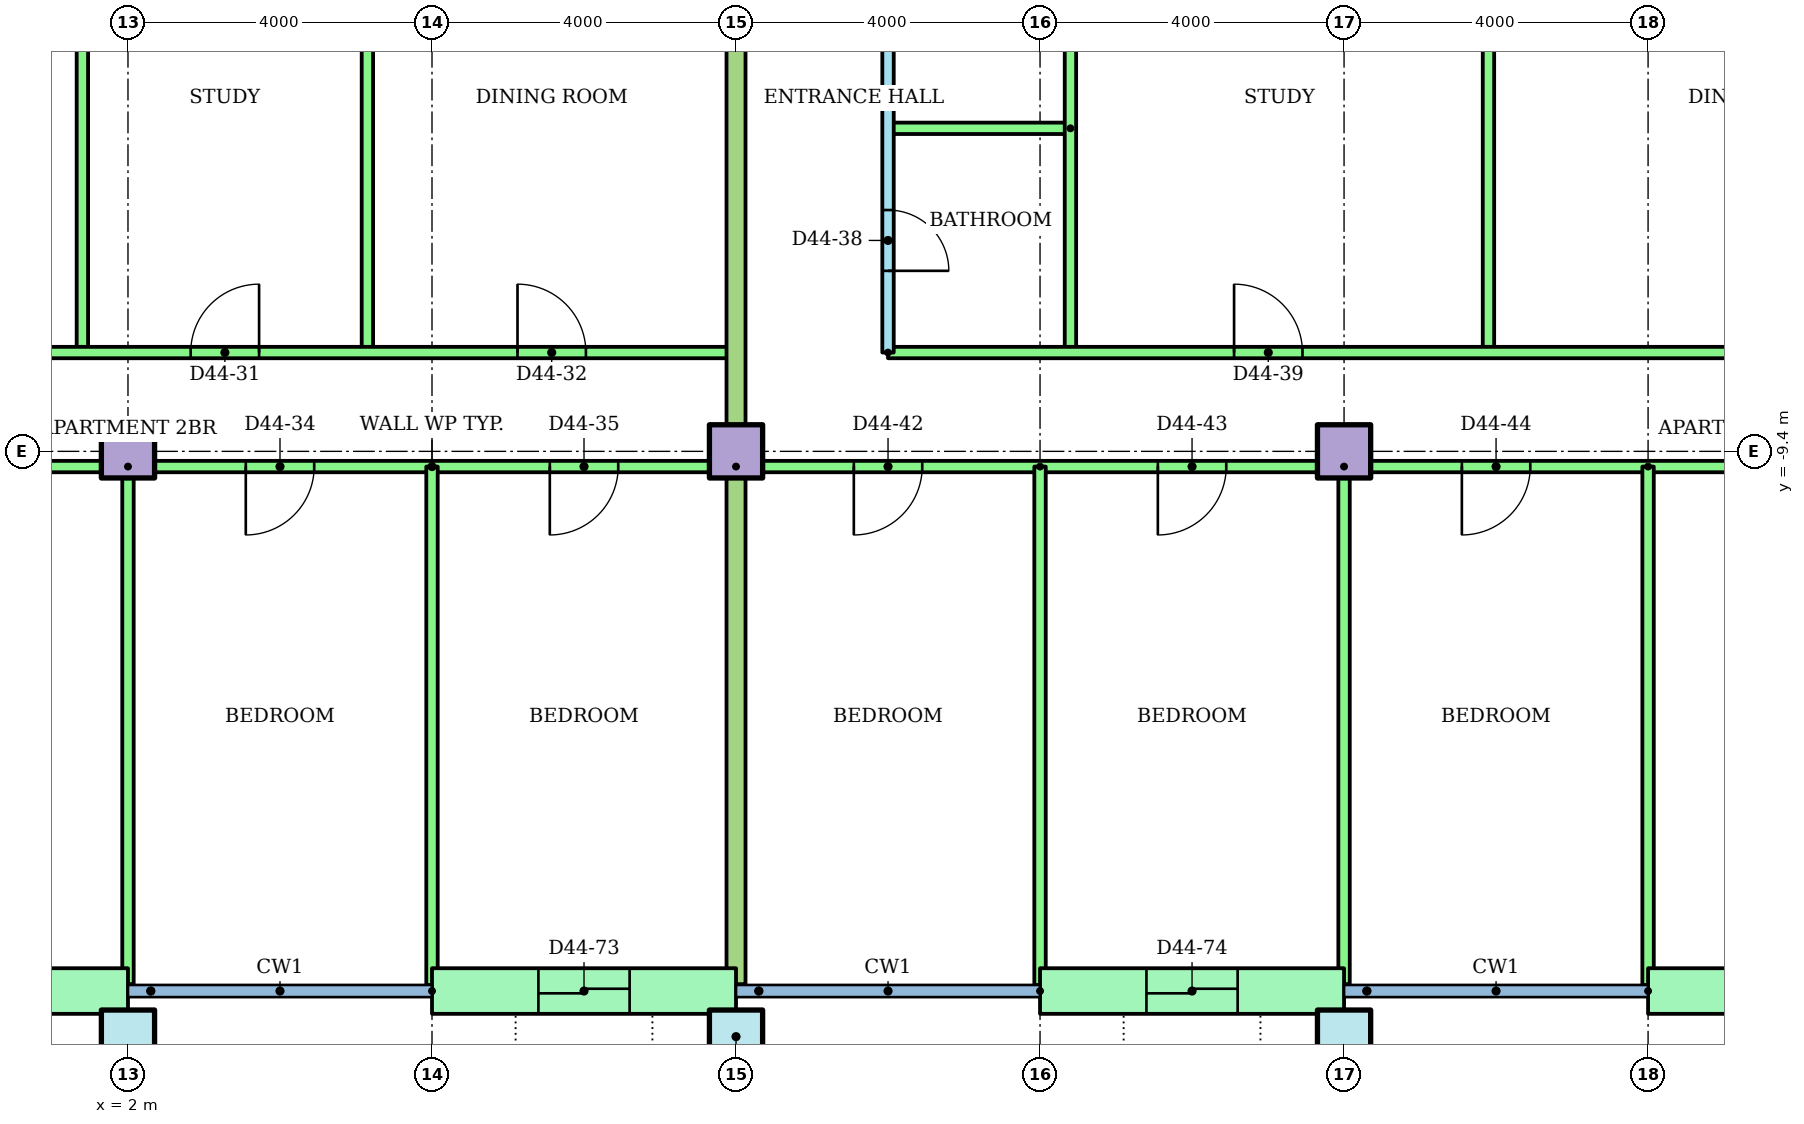
"""IFC4 building model, lengths in metres.
Left out: names, types, materials, properties, quantities, classifications, styles, units other than length and angle.
Written with IfcOpenShell. Run it as: python <this file> out.ifc"""

import sys

from ifc_helpers import new_model, si_unit, direction, frame, frame_2d, origin, origin_2d, place, context, subcontext, project, spatial, rectangle, hollow_rectangle, extrude, element, fill, save


model = new_model("IFC4")
c1 = context("Model", 3, precision=1e-05, world=origin(), true_north=direction((0.0, 1.0)))
c2 = subcontext(c1, "Body", "Model", "MODEL_VIEW")
j1 = project(units=[si_unit("LENGTHUNIT", "METRE"), si_unit("PLANEANGLEUNIT", "RADIAN")], contexts=[c1])
p1 = place(None, origin())
s1 = spatial("IfcSite", under=j1, at=p1, CompositionType="ELEMENT")
p2 = place(p1, origin())
s2 = spatial("IfcBuilding", under=s1, at=p2, CompositionType="ELEMENT")
p3 = place(p2, frame((0.0, 0.0, 171.7)))
s3 = spatial("IfcBuildingStorey", under=s2, at=p3, CompositionType="ELEMENT", Elevation=171.7)
for number, where in (
    (1, (2.0, -17.1, 0.0)),
    (2, (10.0, -17.1, 0.0)),
    (3, (18.0, -17.1, 0.0)),
):
    element("IfcColumn", number, at=place(p3, frame(where)), inside=s3, PredefinedType="COLUMN", context=c2, shape_type="SweptSolid", body=[
        extrude(hollow_rectangle(XDim=0.7, YDim=0.7, WallThickness=0.036, at=origin_2d()), origin(), (0.0, 0.0, 1.0), 3.2),
    ])
for number, where in (
    (4, (2.0, -9.4, 0.0)),
    (5, (10.0, -9.4, 0.0)),
    (6, (18.0, -9.4, 0.0)),
):
    element("IfcColumn", number, at=place(p3, frame(where)), inside=s3, PredefinedType="COLUMN", context=c2, shape_type="SweptSolid", body=[
        extrude(rectangle(XDim=0.7, YDim=0.7, at=origin_2d()), origin(), (0.0, 0.0, 1.0), 3.2),
    ])
p4 = place(p3, frame((-2.0, -16.5, 0.0)))
e7 = element("IfcWall", 7, at=p4, inside=s3, PredefinedType="STANDARD", context=c2, shape_type="SweptSolid", body=[
    extrude(rectangle(XDim=4.0, YDim=0.6, at=frame_2d((2.0, 0.0))), origin(), (0.0, 0.0, 1.0), 2.92),
])
p5 = place(p4, frame((1.4, 0.0, 0.0)))
e8 = element("IfcOpeningElement", 8, at=p5, cuts=e7, PredefinedType="OPENING", context=c2, shape_type="SweptSolid", body=[
    extrude(rectangle(XDim=1.2, YDim=2.1, at=frame_2d((0.6, 1.05))), frame((0.0, 0.31, 0.0), z_axis=(0.0, -1.0, 0.0), x_axis=(1.0, 0.0, 0.0)), (0.0, 0.0, 1.0), 0.62),
])
p6 = place(p3, frame((6.0, -16.5, 0.0)))
e9 = element("IfcWall", 9, at=p6, inside=s3, PredefinedType="STANDARD", context=c2, shape_type="SweptSolid", body=[
    extrude(rectangle(XDim=4.0, YDim=0.6, at=frame_2d((2.0, 0.0))), origin(), (0.0, 0.0, 1.0), 2.92),
])
p7 = place(p6, frame((1.4, 0.0, 0.0)))
e10 = element("IfcOpeningElement", 10, at=p7, cuts=e9, PredefinedType="OPENING", context=c2, shape_type="SweptSolid", body=[
    extrude(rectangle(XDim=1.2, YDim=2.1, at=frame_2d((0.6, 1.05))), frame((0.0, 0.31, 0.0), z_axis=(0.0, -1.0, 0.0), x_axis=(1.0, 0.0, 0.0)), (0.0, 0.0, 1.0), 0.62),
])
p8 = place(p3, frame((14.0, -16.5, 0.0)))
e11 = element("IfcWall", 11, at=p8, inside=s3, PredefinedType="STANDARD", context=c2, shape_type="SweptSolid", body=[
    extrude(rectangle(XDim=4.0, YDim=0.6, at=frame_2d((2.0, 0.0))), origin(), (0.0, 0.0, 1.0), 2.92),
])
p9 = place(p8, frame((1.4, 0.0, 0.0)))
e12 = element("IfcOpeningElement", 12, at=p9, cuts=e11, PredefinedType="OPENING", context=c2, shape_type="SweptSolid", body=[
    extrude(rectangle(XDim=1.2, YDim=2.1, at=frame_2d((0.6, 1.05))), frame((0.0, 0.31, 0.0), z_axis=(0.0, -1.0, 0.0), x_axis=(1.0, 0.0, 0.0)), (0.0, 0.0, 1.0), 0.62),
])
p10 = place(p3, frame((22.0, -16.5, 0.0)))
e13 = element("IfcWall", 13, at=p10, inside=s3, PredefinedType="STANDARD", context=c2, shape_type="SweptSolid", body=[
    extrude(rectangle(XDim=4.0, YDim=0.6, at=frame_2d((2.0, 0.0))), origin(), (0.0, 0.0, 1.0), 2.92),
])
p11 = place(p10, frame((1.4, 0.0, 0.0)))
e14 = element("IfcOpeningElement", 14, at=p11, cuts=e13, PredefinedType="OPENING", context=c2, shape_type="SweptSolid", body=[
    extrude(rectangle(XDim=1.2, YDim=2.1, at=frame_2d((0.6, 1.05))), frame((0.0, 0.31, 0.0), z_axis=(0.0, -1.0, 0.0), x_axis=(1.0, 0.0, 0.0)), (0.0, 0.0, 1.0), 0.62),
])
for number, where, z_axis, x_axis in (
    (15, (1.4, -1.4, 0.0), (0.0, 0.0, 1.0), (0.0, -1.0, 0.0)),
    (16, (5.15, -1.4, 0.0), (0.0, 0.0, 1.0), (0.0, -1.0, 0.0)),
):
    element("IfcWall", number, at=place(p3, frame(where, z_axis=z_axis, x_axis=x_axis)), inside=s3, PredefinedType="PARTITIONING", context=c2, shape_type="SweptSolid", body=[
        extrude(rectangle(XDim=6.7, YDim=0.15, at=frame_2d((3.35, 0.0))), origin(), (0.0, 0.0, 1.0), 2.4),
    ])
p12 = place(p3, frame((-4.0, -8.1, 0.0)))
e17 = element("IfcWall", 17, at=p12, inside=s3, PredefinedType="PARTITIONING", context=c2, shape_type="SweptSolid", body=[
    extrude(rectangle(XDim=14.0, YDim=0.15, at=frame_2d((7.0, 0.0))), origin(), (0.0, 0.0, 1.0), 2.4),
])
p13 = place(p12, frame((3.45, 0.0, 0.0)))
e18 = element("IfcOpeningElement", 18, at=p13, cuts=e17, PredefinedType="OPENING", context=c2, shape_type="SweptSolid", body=[
    extrude(rectangle(XDim=0.9, YDim=2.1, at=frame_2d((0.45, 1.05))), frame((0.0, 0.085, 0.0), z_axis=(0.0, -1.0, 0.0), x_axis=(1.0, 0.0, 0.0)), (0.0, 0.0, 1.0), 0.17),
])
p14 = place(p12, frame((6.825, 0.0, 0.0)))
e19 = element("IfcOpeningElement", 19, at=p14, cuts=e17, PredefinedType="OPENING", context=c2, shape_type="SweptSolid", body=[
    extrude(rectangle(XDim=0.9, YDim=2.1, at=frame_2d((0.45, 1.05))), frame((0.0, 0.085, 0.0), z_axis=(0.0, -1.0, 0.0), x_axis=(1.0, 0.0, 0.0)), (0.0, 0.0, 1.0), 0.17),
])
p15 = place(p12, frame((11.125, 0.0, 0.0)))
e20 = element("IfcOpeningElement", 20, at=p15, cuts=e17, PredefinedType="OPENING", context=c2, shape_type="SweptSolid", body=[
    extrude(rectangle(XDim=0.9, YDim=2.1, at=frame_2d((0.45, 1.05))), frame((0.0, 0.085, 0.0), z_axis=(0.0, -1.0, 0.0), x_axis=(1.0, 0.0, 0.0)), (0.0, 0.0, 1.0), 0.17),
])
p16 = place(p3, frame((10.0, -9.6, 0.0), z_axis=(0.0, 0.0, 1.0), x_axis=(-1.0, 0.0, 0.0)))
e21 = element("IfcWall", 21, at=p16, inside=s3, PredefinedType="PARTITIONING", context=c2, shape_type="SweptSolid", body=[
    extrude(rectangle(XDim=16.0, YDim=0.15, at=frame_2d((8.0, 0.0))), origin(), (0.0, 0.0, 1.0), 2.4),
])
p17 = place(p16, frame((11.5, 0.0, 0.0)))
e22 = element("IfcOpeningElement", 22, at=p17, cuts=e21, PredefinedType="OPENING", context=c2, shape_type="SweptSolid", body=[
    extrude(rectangle(XDim=1.0, YDim=2.1, at=frame_2d((0.5, 1.05))), frame((0.0, 0.085, 0.0), z_axis=(0.0, -1.0, 0.0), x_axis=(1.0, 0.0, 0.0)), (0.0, 0.0, 1.0), 0.17),
])
p18 = place(p16, frame((5.55, 0.0, 0.0)))
e23 = element("IfcOpeningElement", 23, at=p18, cuts=e21, PredefinedType="OPENING", context=c2, shape_type="SweptSolid", body=[
    extrude(rectangle(XDim=0.9, YDim=2.1, at=frame_2d((0.45, 1.05))), frame((0.0, 0.085, 0.0), z_axis=(0.0, -1.0, 0.0), x_axis=(1.0, 0.0, 0.0)), (0.0, 0.0, 1.0), 0.17),
])
p19 = place(p16, frame((1.55, 0.0, 0.0)))
e24 = element("IfcOpeningElement", 24, at=p19, cuts=e21, PredefinedType="OPENING", context=c2, shape_type="SweptSolid", body=[
    extrude(rectangle(XDim=0.9, YDim=2.1, at=frame_2d((0.45, 1.05))), frame((0.0, 0.085, 0.0), z_axis=(0.0, -1.0, 0.0), x_axis=(1.0, 0.0, 0.0)), (0.0, 0.0, 1.0), 0.17),
])
p20 = place(p3, frame((2.0, -9.6, 0.0), z_axis=(0.0, 0.0, 1.0), x_axis=(0.0, -1.0, 0.0)))
e25 = element("IfcWall", 25, at=p20, inside=s3, PredefinedType="PARTITIONING", context=c2, shape_type="SweptSolid", body=[
    extrude(rectangle(XDim=6.81, YDim=0.15, at=frame_2d((3.405, 0.0))), origin(), (0.0, 0.0, 1.0), 2.4),
])
p21 = place(p3, frame((6.0, -9.6, 0.0), z_axis=(0.0, 0.0, 1.0), x_axis=(0.0, -1.0, 0.0)))
e26 = element("IfcWall", 26, at=p21, inside=s3, PredefinedType="PARTITIONING", context=c2, shape_type="SweptSolid", body=[
    extrude(rectangle(XDim=6.821, YDim=0.15, at=frame_2d((3.41, 0.0))), origin(), (0.0, 0.0, 1.0), 2.4),
])
p22 = place(p3, frame((12.0, -1.4, 0.0), z_axis=(0.0, 0.0, 1.0), x_axis=(0.0, -1.0, 0.0)))
e27 = element("IfcWall", 27, at=p22, inside=s3, PredefinedType="PARTITIONING", context=c2, shape_type="SweptSolid", body=[
    extrude(rectangle(XDim=6.7, YDim=0.15, at=frame_2d((3.35, 0.0))), origin(), (0.0, 0.0, 1.0), 2.4),
])
p23 = place(p22, frame((1.425, 0.0, 0.0)))
e28 = element("IfcOpeningElement", 28, at=p23, cuts=e27, PredefinedType="OPENING", context=c2, shape_type="SweptSolid", body=[
    extrude(rectangle(XDim=0.9, YDim=2.1, at=frame_2d((0.45, 1.05))), frame((0.0, 0.085, 0.0), z_axis=(0.0, -1.0, 0.0), x_axis=(1.0, 0.0, 0.0)), (0.0, 0.0, 1.0), 0.17),
])
p24 = place(p22, frame((4.825, 0.0, 0.0)))
e29 = element("IfcOpeningElement", 29, at=p24, cuts=e27, PredefinedType="OPENING", context=c2, shape_type="SweptSolid", body=[
    extrude(rectangle(XDim=0.8, YDim=2.1, at=frame_2d((0.4, 1.05))), frame((0.0, 0.085, 0.0), z_axis=(0.0, -1.0, 0.0), x_axis=(1.0, 0.0, 0.0)), (0.0, 0.0, 1.0), 0.17),
])
p25 = place(p3, frame((14.4, -5.15, 0.0), z_axis=(0.0, 0.0, 1.0), x_axis=(-1.0, 0.0, 0.0)))
e30 = element("IfcWall", 30, at=p25, inside=s3, PredefinedType="PARTITIONING", context=c2, shape_type="SweptSolid", body=[
    extrude(rectangle(XDim=2.4, YDim=0.15, at=frame_2d((1.2, 0.0))), origin(), (0.0, 0.0, 1.0), 2.4),
])
for number, where, z_axis, x_axis in (
    (31, (14.4, -1.4, 0.0), (0.0, 0.0, 1.0), (0.0, -1.0, 0.0)),
    (32, (19.9, -1.4, 0.0), (0.0, 0.0, 1.0), (0.0, -1.0, 0.0)),
):
    element("IfcWall", number, at=place(p3, frame(where, z_axis=z_axis, x_axis=x_axis)), inside=s3, PredefinedType="PARTITIONING", context=c2, shape_type="SweptSolid", body=[
        extrude(rectangle(XDim=6.7, YDim=0.15, at=frame_2d((3.35, 0.0))), origin(), (0.0, 0.0, 1.0), 2.4),
    ])
p26 = place(p3, frame((12.0, -8.1, 0.0)))
e33 = element("IfcWall", 33, at=p26, inside=s3, PredefinedType="PARTITIONING", context=c2, shape_type="SweptSolid", body=[
    extrude(rectangle(XDim=24.82, YDim=0.15, at=frame_2d((12.41, 0.0))), origin(), (0.0, 0.0, 1.0), 2.4),
])
p27 = place(p26, frame((4.553, 0.0, 0.0)))
e34 = element("IfcOpeningElement", 34, at=p27, cuts=e33, PredefinedType="OPENING", context=c2, shape_type="SweptSolid", body=[
    extrude(rectangle(XDim=0.9, YDim=2.1, at=frame_2d((0.45, 1.05))), frame((0.0, 0.085, 0.0), z_axis=(0.0, -1.0, 0.0), x_axis=(1.0, 0.0, 0.0)), (0.0, 0.0, 1.0), 0.17),
])
p28 = place(p26, frame((11.075, 0.0, 0.0)))
e35 = element("IfcOpeningElement", 35, at=p28, cuts=e33, PredefinedType="OPENING", context=c2, shape_type="SweptSolid", body=[
    extrude(rectangle(XDim=0.9, YDim=2.1, at=frame_2d((0.45, 1.05))), frame((0.0, 0.085, 0.0), z_axis=(0.0, -1.0, 0.0), x_axis=(1.0, 0.0, 0.0)), (0.0, 0.0, 1.0), 0.17),
])
p29 = place(p26, frame((19.425, 0.0, 0.0)))
e36 = element("IfcOpeningElement", 36, at=p29, cuts=e33, PredefinedType="OPENING", context=c2, shape_type="SweptSolid", body=[
    extrude(rectangle(XDim=0.9, YDim=2.1, at=frame_2d((0.45, 1.05))), frame((0.0, 0.085, 0.0), z_axis=(0.0, -1.0, 0.0), x_axis=(1.0, 0.0, 0.0)), (0.0, 0.0, 1.0), 0.17),
])
p30 = place(p3, frame((36.82, -9.6, 0.0), z_axis=(0.0, 0.0, 1.0), x_axis=(-1.0, 0.0, 0.0)))
e37 = element("IfcWall", 37, at=p30, inside=s3, PredefinedType="PARTITIONING", context=c2, shape_type="SweptSolid", body=[
    extrude(rectangle(XDim=26.82, YDim=0.15, at=frame_2d((13.41, 0.0))), origin(), (0.0, 0.0, 1.0), 2.4),
])
p31 = place(p30, frame((24.37, 0.0, 0.0)))
e38 = element("IfcOpeningElement", 38, at=p31, cuts=e37, PredefinedType="OPENING", context=c2, shape_type="SweptSolid", body=[
    extrude(rectangle(XDim=0.9, YDim=2.1, at=frame_2d((0.45, 1.05))), frame((0.0, 0.085, 0.0), z_axis=(0.0, -1.0, 0.0), x_axis=(1.0, 0.0, 0.0)), (0.0, 0.0, 1.0), 0.17),
])
p32 = place(p30, frame((20.37, 0.0, 0.0)))
e39 = element("IfcOpeningElement", 39, at=p32, cuts=e37, PredefinedType="OPENING", context=c2, shape_type="SweptSolid", body=[
    extrude(rectangle(XDim=0.9, YDim=2.1, at=frame_2d((0.45, 1.05))), frame((0.0, 0.085, 0.0), z_axis=(0.0, -1.0, 0.0), x_axis=(1.0, 0.0, 0.0)), (0.0, 0.0, 1.0), 0.17),
])
p33 = place(p30, frame((16.37, 0.0, 0.0)))
e40 = element("IfcOpeningElement", 40, at=p33, cuts=e37, PredefinedType="OPENING", context=c2, shape_type="SweptSolid", body=[
    extrude(rectangle(XDim=0.9, YDim=2.1, at=frame_2d((0.45, 1.05))), frame((0.0, 0.085, 0.0), z_axis=(0.0, -1.0, 0.0), x_axis=(1.0, 0.0, 0.0)), (0.0, 0.0, 1.0), 0.17),
])
p34 = place(p30, frame((9.27, 0.0, 0.0)))
e41 = element("IfcOpeningElement", 41, at=p34, cuts=e37, PredefinedType="OPENING", context=c2, shape_type="SweptSolid", body=[
    extrude(rectangle(XDim=1.0, YDim=2.1, at=frame_2d((0.5, 1.05))), frame((0.0, 0.085, 0.0), z_axis=(0.0, -1.0, 0.0), x_axis=(1.0, 0.0, 0.0)), (0.0, 0.0, 1.0), 0.17),
])
p35 = place(p30, frame((1.373, 0.0, 0.0)))
e42 = element("IfcOpeningElement", 42, at=p35, cuts=e37, PredefinedType="OPENING", context=c2, shape_type="SweptSolid", body=[
    extrude(rectangle(XDim=0.9, YDim=2.1, at=frame_2d((0.45, 1.05))), frame((0.0, 0.085, 0.0), z_axis=(0.0, -1.0, 0.0), x_axis=(1.0, 0.0, 0.0)), (0.0, 0.0, 1.0), 0.17),
])
p36 = place(p3, frame((14.0, -9.6, 0.0), z_axis=(0.0, 0.0, 1.0), x_axis=(0.0, -1.0, 0.0)))
e43 = element("IfcWall", 43, at=p36, inside=s3, PredefinedType="PARTITIONING", context=c2, shape_type="SweptSolid", body=[
    extrude(rectangle(XDim=6.821, YDim=0.15, at=frame_2d((3.41, 0.0))), origin(), (0.0, 0.0, 1.0), 2.4),
])
p37 = place(p3, frame((18.0, -9.6, 0.0), z_axis=(0.0, 0.0, 1.0), x_axis=(0.0, -1.0, 0.0)))
e44 = element("IfcWall", 44, at=p37, inside=s3, PredefinedType="PARTITIONING", context=c2, shape_type="SweptSolid", body=[
    extrude(rectangle(XDim=6.81, YDim=0.15, at=frame_2d((3.405, 0.0))), origin(), (0.0, 0.0, 1.0), 2.4),
])
p38 = place(p3, frame((22.0, -9.6, 0.0), z_axis=(0.0, 0.0, 1.0), x_axis=(0.0, -1.0, 0.0)))
e45 = element("IfcWall", 45, at=p38, inside=s3, PredefinedType="PARTITIONING", context=c2, shape_type="SweptSolid", body=[
    extrude(rectangle(XDim=6.821, YDim=0.15, at=frame_2d((3.41, 0.0))), origin(), (0.0, 0.0, 1.0), 2.4),
])
p39 = place(p3, frame((10.0, -1.4, 0.0), z_axis=(0.0, 0.0, 1.0), x_axis=(0.0, -1.0, 0.0)))
e46 = element("IfcWall", 46, at=p39, inside=s3, PredefinedType="PARTITIONING", context=c2, shape_type="SweptSolid", body=[
    extrude(rectangle(XDim=15.01, YDim=0.25, at=frame_2d((7.505, 0.0))), origin(), (0.0, 0.0, 1.0), 2.4),
])
p40 = place(p14, origin())
e47 = element("IfcDoor", 47, at=p40, inside=s3, OperationType="SINGLE_SWING_RIGHT", PredefinedType="DOOR", context=c2, shape_type="SweptSolid", body=[
    extrude(rectangle(XDim=0.9, YDim=2.1, at=frame_2d((0.45, 1.05))), frame((0.0, 0.025, 0.0), z_axis=(0.0, -1.0, 0.0), x_axis=(1.0, 0.0, 0.0)), (0.0, 0.0, 1.0), 0.05),
])
fill(e19, e47)
p41 = place(p15, origin())
e48 = element("IfcDoor", 48, at=p41, inside=s3, OperationType="SINGLE_SWING_LEFT", PredefinedType="DOOR", context=c2, shape_type="SweptSolid", body=[
    extrude(rectangle(XDim=0.9, YDim=2.1, at=frame_2d((0.45, 1.05))), frame((0.0, 0.025, 0.0), z_axis=(0.0, -1.0, 0.0), x_axis=(1.0, 0.0, 0.0)), (0.0, 0.0, 1.0), 0.05),
])
fill(e20, e48)
p42 = place(p18, origin())
e49 = element("IfcDoor", 49, at=p42, inside=s3, OperationType="SINGLE_SWING_RIGHT", PredefinedType="DOOR", context=c2, shape_type="SweptSolid", body=[
    extrude(rectangle(XDim=0.9, YDim=2.1, at=frame_2d((0.45, 1.05))), frame((0.0, 0.025, 0.0), z_axis=(0.0, -1.0, 0.0), x_axis=(1.0, 0.0, 0.0)), (0.0, 0.0, 1.0), 0.05),
])
fill(e23, e49)
p43 = place(p19, origin())
e50 = element("IfcDoor", 50, at=p43, inside=s3, OperationType="SINGLE_SWING_RIGHT", PredefinedType="DOOR", context=c2, shape_type="SweptSolid", body=[
    extrude(rectangle(XDim=0.9, YDim=2.1, at=frame_2d((0.45, 1.05))), frame((0.0, 0.025, 0.0), z_axis=(0.0, -1.0, 0.0), x_axis=(1.0, 0.0, 0.0)), (0.0, 0.0, 1.0), 0.05),
])
fill(e24, e50)
p44 = place(p24, origin())
e51 = element("IfcDoor", 51, at=p44, inside=s3, OperationType="SINGLE_SWING_RIGHT", PredefinedType="DOOR", context=c2, shape_type="SweptSolid", body=[
    extrude(rectangle(XDim=0.8, YDim=2.1, at=frame_2d((0.4, 1.05))), frame((0.0, 0.025, 0.0), z_axis=(0.0, -1.0, 0.0), x_axis=(1.0, 0.0, 0.0)), (0.0, 0.0, 1.0), 0.05),
])
fill(e29, e51)
p45 = place(p27, origin())
e52 = element("IfcDoor", 52, at=p45, inside=s3, OperationType="SINGLE_SWING_LEFT", PredefinedType="DOOR", context=c2, shape_type="SweptSolid", body=[
    extrude(rectangle(XDim=0.9, YDim=2.1, at=frame_2d((0.45, 1.05))), frame((0.0, 0.025, 0.0), z_axis=(0.0, -1.0, 0.0), x_axis=(1.0, 0.0, 0.0)), (0.0, 0.0, 1.0), 0.05),
])
fill(e34, e52)
p46 = place(p31, origin())
e53 = element("IfcDoor", 53, at=p46, inside=s3, OperationType="SINGLE_SWING_RIGHT", PredefinedType="DOOR", context=c2, shape_type="SweptSolid", body=[
    extrude(rectangle(XDim=0.9, YDim=2.1, at=frame_2d((0.45, 1.05))), frame((0.0, 0.025, 0.0), z_axis=(0.0, -1.0, 0.0), x_axis=(1.0, 0.0, 0.0)), (0.0, 0.0, 1.0), 0.05),
])
fill(e38, e53)
p47 = place(p32, origin())
e54 = element("IfcDoor", 54, at=p47, inside=s3, OperationType="SINGLE_SWING_RIGHT", PredefinedType="DOOR", context=c2, shape_type="SweptSolid", body=[
    extrude(rectangle(XDim=0.9, YDim=2.1, at=frame_2d((0.45, 1.05))), frame((0.0, 0.025, 0.0), z_axis=(0.0, -1.0, 0.0), x_axis=(1.0, 0.0, 0.0)), (0.0, 0.0, 1.0), 0.05),
])
fill(e39, e54)
p48 = place(p33, origin())
e55 = element("IfcDoor", 55, at=p48, inside=s3, OperationType="SINGLE_SWING_RIGHT", PredefinedType="DOOR", context=c2, shape_type="SweptSolid", body=[
    extrude(rectangle(XDim=0.9, YDim=2.1, at=frame_2d((0.45, 1.05))), frame((0.0, 0.025, 0.0), z_axis=(0.0, -1.0, 0.0), x_axis=(1.0, 0.0, 0.0)), (0.0, 0.0, 1.0), 0.05),
])
fill(e40, e55)
p49 = place(p7, origin())
e56 = element("IfcDoor", 56, at=p49, inside=s3, OperationType="SLIDING_TO_LEFT", PredefinedType="DOOR", context=c2, shape_type="SweptSolid", body=[
    extrude(rectangle(XDim=1.2, YDim=2.1, at=frame_2d((0.6, 1.05))), frame((0.0, 0.025, 0.0), z_axis=(0.0, -1.0, 0.0), x_axis=(1.0, 0.0, 0.0)), (0.0, 0.0, 1.0), 0.05),
])
fill(e10, e56)
p50 = place(p9, origin())
e57 = element("IfcDoor", 57, at=p50, inside=s3, OperationType="SLIDING_TO_LEFT", PredefinedType="DOOR", context=c2, shape_type="SweptSolid", body=[
    extrude(rectangle(XDim=1.2, YDim=2.1, at=frame_2d((0.6, 1.05))), frame((0.0, 0.025, 0.0), z_axis=(0.0, -1.0, 0.0), x_axis=(1.0, 0.0, 0.0)), (0.0, 0.0, 1.0), 0.05),
])
fill(e12, e57)
save(model, sys.argv[1])
